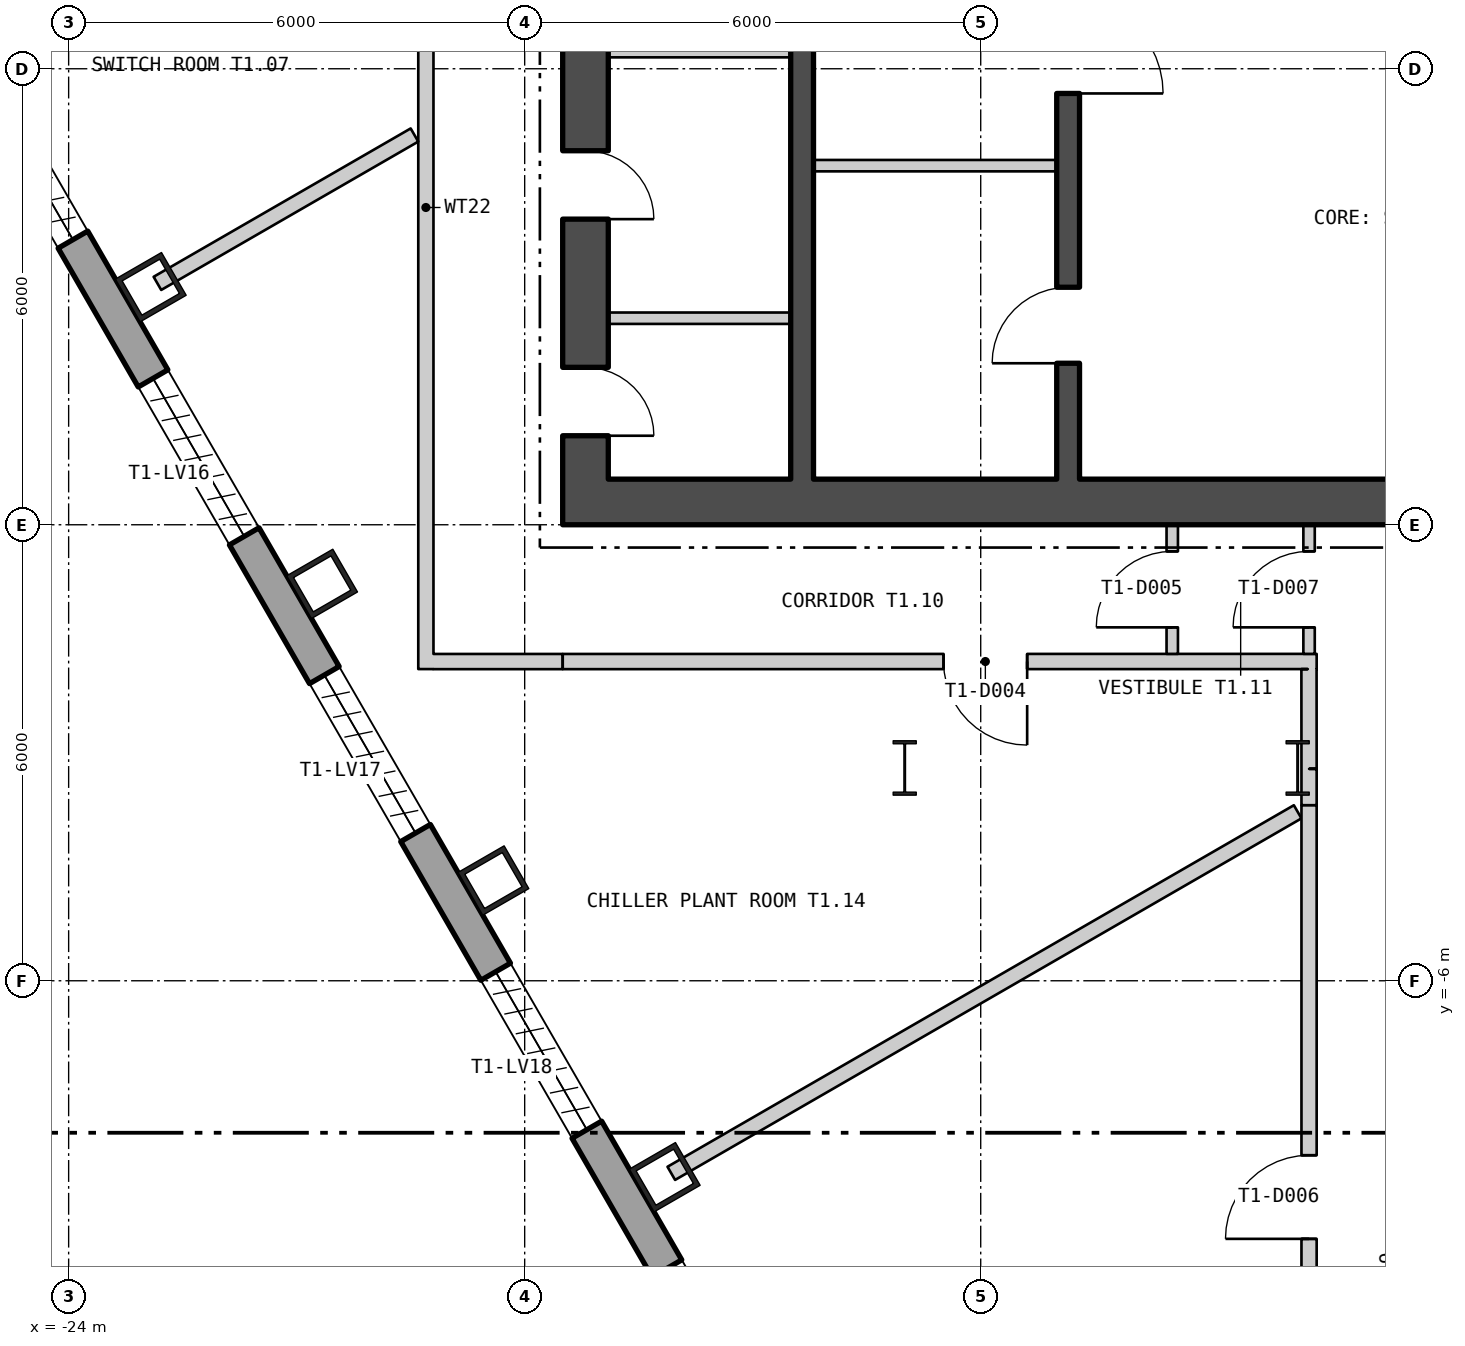
"""IFC4 building model, lengths in metres.
Left out: names, types, materials, properties, quantities, classifications, styles, units other than length and angle.
Written with IfcOpenShell. Run it as: python <this file> out.ifc"""

import sys

from ifc_helpers import new_model, si_unit, direction, frame, frame_2d, origin, origin_2d, place, context, subcontext, project, spatial, polyline, rectangle, hollow_rectangle, i_section, outline, extrude, element, fill, save


model = new_model("IFC4")
c1 = context("Model", 3, precision=1e-05, world=origin(), true_north=direction((0.0, 1.0)))
c2 = subcontext(c1, "Body", "Model", "MODEL_VIEW")
j1 = project(units=[si_unit("LENGTHUNIT", "METRE"), si_unit("PLANEANGLEUNIT", "RADIAN")], contexts=[c1])
p1 = place(None, origin())
s1 = spatial("IfcSite", under=j1, at=p1, CompositionType="ELEMENT")
p2 = place(p1, origin())
s2 = spatial("IfcBuilding", under=s1, at=p2, CompositionType="ELEMENT")
p3 = place(p2, frame((0.0, 0.0, 78.3)))
s3 = spatial("IfcBuildingStorey", under=s2, at=p3, CompositionType="ELEMENT", Elevation=78.3)
for number, where, z_axis, x_axis in (
    (1, (-22.919, 3.126, 0.0), (0.0, 0.0, 1.0), (0.5, -0.866, 0.0)),
    (2, (-20.665, -0.778, 0.0), (0.0, 0.0, 1.0), (0.5, -0.866, 0.0)),
    (3, (-18.411, -4.681, 0.0), (0.0, 0.0, 1.0), (0.5, -0.866, 0.0)),
    (4, (-16.157, -8.585, 0.0), (0.0, 0.0, 1.0), (0.5, -0.866, 0.0)),
):
    element("IfcColumn", number, at=place(p3, frame(where, z_axis=z_axis, x_axis=x_axis)), inside=s3, PredefinedType="COLUMN", context=c2, shape_type="SweptSolid", body=[
        extrude(hollow_rectangle(XDim=0.65, YDim=0.7, WallThickness=0.065, at=origin_2d()), origin(), (0.0, 0.0, 1.0), 6.0),
    ])
for number, where, z_axis, x_axis in (
    (5, (-7.83, -3.2, 0.0), (0.0, 0.0, 1.0), (1.0, 0.0, 0.0)),
    (6, (-13.0, -3.2, 0.0), (0.0, 0.0, 1.0), (1.0, 0.0, 0.0)),
):
    element("IfcColumn", number, at=place(p3, frame(where, z_axis=z_axis, x_axis=x_axis)), inside=s3, PredefinedType="COLUMN", context=c2, shape_type="SweptSolid", body=[
        extrude(i_section(OverallWidth=0.304, OverallDepth=0.716, WebThickness=0.021, FlangeThickness=0.04, at=origin_2d()), origin(), (0.0, 0.0, 1.0), 6.0),
    ])
p4 = place(p3, frame((-28.09, 10.934, -0.18), z_axis=(0.0, 0.0, 1.0), x_axis=(0.500000711659, -0.866024992908, 0.0)))
e7 = element("IfcWall", 7, at=p4, inside=s3, PredefinedType="SOLIDWALL", context=c2, shape_type="SweptSolid", body=[
    extrude(outline(polyline([(-0.13, -0.225), (45.87, -0.225), (45.61, 0.225), (0.13, 0.225), (-0.13, -0.225)])), origin(), (0.0, 0.0, 1.0), 6.0),
])
p5 = place(p4, frame((1.424, 0.0, 1.38)))
e8 = element("IfcOpeningElement", 8, at=p5, cuts=e7, PredefinedType="OPENING", context=c2, shape_type="SweptSolid", body=[
    extrude(rectangle(XDim=2.4, YDim=3.6, at=frame_2d((1.2, 1.8))), frame((0.0, 0.235, 0.0), z_axis=(0.0, -1.0, 0.0), x_axis=(1.0, 0.0, 0.0)), (0.0, 0.0, 1.0), 0.47),
])
p6 = place(p4, frame((5.893, 0.0, 1.38)))
e9 = element("IfcOpeningElement", 9, at=p6, cuts=e7, PredefinedType="OPENING", context=c2, shape_type="SweptSolid", body=[
    extrude(rectangle(XDim=2.4, YDim=3.6, at=frame_2d((1.2, 1.8))), frame((0.0, 0.235, 0.0), z_axis=(0.0, -1.0, 0.0), x_axis=(1.0, 0.0, 0.0)), (0.0, 0.0, 1.0), 0.47),
])
p7 = place(p4, frame((10.401, 0.0, 1.38)))
e10 = element("IfcOpeningElement", 10, at=p7, cuts=e7, PredefinedType="OPENING", context=c2, shape_type="SweptSolid", body=[
    extrude(rectangle(XDim=2.4, YDim=3.6, at=frame_2d((1.2, 1.8))), frame((0.0, 0.235, 0.0), z_axis=(0.0, -1.0, 0.0), x_axis=(1.0, 0.0, 0.0)), (0.0, 0.0, 1.0), 0.47),
])
p8 = place(p4, frame((14.909, 0.0, 1.38)))
e11 = element("IfcOpeningElement", 11, at=p8, cuts=e7, PredefinedType="OPENING", context=c2, shape_type="SweptSolid", body=[
    extrude(rectangle(XDim=2.4, YDim=3.6, at=frame_2d((1.2, 1.8))), frame((0.0, 0.235, 0.0), z_axis=(0.0, -1.0, 0.0), x_axis=(1.0, 0.0, 0.0)), (0.0, 0.0, 1.0), 0.47),
])
p9 = place(p4, frame((19.416, 0.0, 1.38)))
e12 = element("IfcOpeningElement", 12, at=p9, cuts=e7, PredefinedType="OPENING", context=c2, shape_type="SweptSolid", body=[
    extrude(rectangle(XDim=2.4, YDim=3.6, at=frame_2d((1.2, 1.8))), frame((0.0, 0.235, 0.0), z_axis=(0.0, -1.0, 0.0), x_axis=(1.0, 0.0, 0.0)), (0.0, 0.0, 1.0), 0.47),
])
p10 = place(p4, frame((23.924, 0.0, 1.38)))
e13 = element("IfcOpeningElement", 13, at=p10, cuts=e7, PredefinedType="OPENING", context=c2, shape_type="SweptSolid", body=[
    extrude(rectangle(XDim=2.4, YDim=3.6, at=frame_2d((1.2, 1.8))), frame((0.0, 0.235, 0.0), z_axis=(0.0, -1.0, 0.0), x_axis=(1.0, 0.0, 0.0)), (0.0, 0.0, 1.0), 0.47),
])
p11 = place(p4, frame((28.431, 0.0, 1.38)))
e14 = element("IfcOpeningElement", 14, at=p11, cuts=e7, PredefinedType="OPENING", context=c2, shape_type="SweptSolid", body=[
    extrude(rectangle(XDim=2.4, YDim=3.6, at=frame_2d((1.2, 1.8))), frame((0.0, 0.235, 0.0), z_axis=(0.0, -1.0, 0.0), x_axis=(1.0, 0.0, 0.0)), (0.0, 0.0, 1.0), 0.47),
])
p12 = place(p4, frame((32.939, 0.0, 1.38)))
e15 = element("IfcOpeningElement", 15, at=p12, cuts=e7, PredefinedType="OPENING", context=c2, shape_type="SweptSolid", body=[
    extrude(rectangle(XDim=2.4, YDim=3.6, at=frame_2d((1.2, 1.8))), frame((0.0, 0.235, 0.0), z_axis=(0.0, -1.0, 0.0), x_axis=(1.0, 0.0, 0.0)), (0.0, 0.0, 1.0), 0.47),
])
p13 = place(p4, frame((37.447, 0.0, 1.38)))
e16 = element("IfcOpeningElement", 16, at=p13, cuts=e7, PredefinedType="OPENING", context=c2, shape_type="SweptSolid", body=[
    extrude(rectangle(XDim=2.4, YDim=3.6, at=frame_2d((1.2, 1.8))), frame((0.0, 0.235, 0.0), z_axis=(0.0, -1.0, 0.0), x_axis=(1.0, 0.0, 0.0)), (0.0, 0.0, 1.0), 0.47),
])
p14 = place(p4, frame((41.916, 0.0, 1.38)))
e17 = element("IfcOpeningElement", 17, at=p14, cuts=e7, PredefinedType="OPENING", context=c2, shape_type="SweptSolid", body=[
    extrude(rectangle(XDim=2.4, YDim=3.6, at=frame_2d((1.2, 1.8))), frame((0.0, 0.235, 0.0), z_axis=(0.0, -1.0, 0.0), x_axis=(1.0, 0.0, 0.0)), (0.0, 0.0, 1.0), 0.47),
])
p15 = place(p3, frame((-17.5, 0.3, 0.0), z_axis=(0.0, 0.0, 1.0), x_axis=(1.0, 0.0, 0.0)))
e18 = element("IfcWall", 18, at=p15, inside=s3, PredefinedType="SHEAR", context=c2, shape_type="SweptSolid", body=[
    extrude(rectangle(XDim=35.0, YDim=0.6, at=frame_2d((17.5, 0.0))), origin(), (0.0, 0.0, 1.0), 5.8),
])
p16 = place(p15, frame((12.0, 0.0, 0.0)))
e19 = element("IfcOpeningElement", 19, at=p16, cuts=e18, PredefinedType="OPENING", context=c2, shape_type="SweptSolid", body=[
    extrude(rectangle(XDim=1.8, YDim=2.4, at=frame_2d((0.9, 1.2))), frame((0.0, 0.31, 0.0), z_axis=(0.0, -1.0, 0.0), x_axis=(1.0, 0.0, 0.0)), (0.0, 0.0, 1.0), 0.62),
])
p17 = place(p15, frame((22.0, 0.0, 0.0)))
e20 = element("IfcOpeningElement", 20, at=p17, cuts=e18, PredefinedType="OPENING", context=c2, shape_type="SweptSolid", body=[
    extrude(rectangle(XDim=1.8, YDim=2.4, at=frame_2d((0.9, 1.2))), frame((0.0, 0.31, 0.0), z_axis=(0.0, -1.0, 0.0), x_axis=(1.0, 0.0, 0.0)), (0.0, 0.0, 1.0), 0.62),
])
p18 = place(p3, frame((-17.2, 0.6, 0.0), z_axis=(0.0, 0.0, 1.0), x_axis=(0.0, 1.0, 0.0)))
e21 = element("IfcWall", 21, at=p18, inside=s3, PredefinedType="SHEAR", context=c2, shape_type="SweptSolid", body=[
    extrude(rectangle(XDim=16.8, YDim=0.6, at=frame_2d((8.4, 0.0))), origin(), (0.0, 0.0, 1.0), 5.8),
])
p19 = place(p18, frame((5.7, 0.0, 0.0)))
e22 = element("IfcOpeningElement", 22, at=p19, cuts=e21, PredefinedType="OPENING", context=c2, shape_type="SweptSolid", body=[
    extrude(rectangle(XDim=1.5, YDim=2.1, at=frame_2d((0.75, 1.05))), frame((0.0, 0.31, 0.0), z_axis=(0.0, -1.0, 0.0), x_axis=(1.0, 0.0, 0.0)), (0.0, 0.0, 1.0), 0.62),
])
p20 = place(p18, frame((0.571, 0.0, 0.0)))
e23 = element("IfcOpeningElement", 23, at=p20, cuts=e21, PredefinedType="OPENING", context=c2, shape_type="SweptSolid", body=[
    extrude(rectangle(XDim=0.9, YDim=2.1, at=frame_2d((0.45, 1.05))), frame((0.0, 0.31, 0.0), z_axis=(0.0, -1.0, 0.0), x_axis=(1.0, 0.0, 0.0)), (0.0, 0.0, 1.0), 0.62),
])
p21 = place(p18, frame((3.421, 0.0, 0.0)))
e24 = element("IfcOpeningElement", 24, at=p21, cuts=e21, PredefinedType="OPENING", context=c2, shape_type="SweptSolid", body=[
    extrude(rectangle(XDim=0.9, YDim=2.1, at=frame_2d((0.45, 1.05))), frame((0.0, 0.31, 0.0), z_axis=(0.0, -1.0, 0.0), x_axis=(1.0, 0.0, 0.0)), (0.0, 0.0, 1.0), 0.62),
])
p22 = place(p18, frame((9.473, 0.0, 0.0)))
e25 = element("IfcOpeningElement", 25, at=p22, cuts=e21, PredefinedType="OPENING", context=c2, shape_type="SweptSolid", body=[
    extrude(rectangle(XDim=1.0, YDim=2.1, at=frame_2d((0.5, 1.05))), frame((0.0, 0.31, 0.0), z_axis=(0.0, -1.0, 0.0), x_axis=(1.0, 0.0, 0.0)), (0.0, 0.0, 1.0), 0.62),
])
p23 = place(p18, frame((14.323, 0.0, 0.0)))
e26 = element("IfcOpeningElement", 26, at=p23, cuts=e21, PredefinedType="OPENING", context=c2, shape_type="SweptSolid", body=[
    extrude(rectangle(XDim=0.9, YDim=2.1, at=frame_2d((0.45, 1.05))), frame((0.0, 0.31, 0.0), z_axis=(0.0, -1.0, 0.0), x_axis=(1.0, 0.0, 0.0)), (0.0, 0.0, 1.0), 0.62),
])
p24 = place(p3, frame((-10.85, 0.6, 0.0), z_axis=(0.0, 0.0, 1.0), x_axis=(0.0, 1.0, 0.0)))
e27 = element("IfcWall", 27, at=p24, inside=s3, PredefinedType="SHEAR", context=c2, shape_type="SweptSolid", body=[
    extrude(rectangle(XDim=16.8, YDim=0.3, at=frame_2d((8.4, 0.0))), origin(), (0.0, 0.0, 1.0), 5.8),
])
p25 = place(p24, frame((5.075, 0.0, 0.0)))
e28 = element("IfcOpeningElement", 28, at=p25, cuts=e27, PredefinedType="OPENING", context=c2, shape_type="SweptSolid", body=[
    extrude(rectangle(XDim=1.25, YDim=2.1, at=frame_2d((0.625, 1.05))), frame((0.0, 0.16, 0.0), z_axis=(0.0, -1.0, 0.0), x_axis=(1.0, 0.0, 0.0)), (0.0, 0.0, 1.0), 0.32),
])
p26 = place(p24, frame((1.525, 0.0, 0.0)))
e29 = element("IfcOpeningElement", 29, at=p26, cuts=e27, PredefinedType="OPENING", context=c2, shape_type="SweptSolid", body=[
    extrude(rectangle(XDim=1.0, YDim=2.1, at=frame_2d((0.5, 1.05))), frame((0.0, 0.16, 0.0), z_axis=(0.0, -1.0, 0.0), x_axis=(1.0, 0.0, 0.0)), (0.0, 0.0, 1.0), 0.32),
])
p27 = place(p3, frame((-14.35, 0.6, 0.0), z_axis=(0.0, 0.0, 1.0), x_axis=(0.0, 1.0, 0.0)))
e30 = element("IfcWall", 30, at=p27, inside=s3, PredefinedType="SHEAR", context=c2, shape_type="SweptSolid", body=[
    extrude(rectangle(XDim=16.8, YDim=0.3, at=frame_2d((8.4, 0.0))), origin(), (0.0, 0.0, 1.0), 5.8),
])
p28 = place(p27, frame((5.7, 0.0, 0.0)))
e31 = element("IfcOpeningElement", 31, at=p28, cuts=e30, PredefinedType="OPENING", context=c2, shape_type="SweptSolid", body=[
    extrude(rectangle(XDim=1.5, YDim=2.1, at=frame_2d((0.75, 1.05))), frame((0.0, 0.16, 0.0), z_axis=(0.0, -1.0, 0.0), x_axis=(1.0, 0.0, 0.0)), (0.0, 0.0, 1.0), 0.32),
])
p29 = place(p3, frame((-14.2, 4.725, 0.0), z_axis=(0.0, 0.0, 1.0), x_axis=(1.0, 0.0, 0.0)))
e32 = element("IfcWall", 32, at=p29, inside=s3, PredefinedType="PARTITIONING", context=c2, shape_type="SweptSolid", body=[
    extrude(rectangle(XDim=3.2, YDim=0.15, at=frame_2d((1.6, 0.0))), origin(), (0.0, 0.0, 1.0), 5.8),
])
for number, where, z_axis, x_axis in (
    (33, (-16.9, 6.225, 0.0), (0.0, 0.0, 1.0), (1.0, 0.0, 0.0)),
    (34, (-16.9, 2.718, 0.0), (0.0, 0.0, 1.0), (1.0, 0.0, 0.0)),
):
    element("IfcWall", number, at=place(p3, frame(where, z_axis=z_axis, x_axis=x_axis)), inside=s3, PredefinedType="PARTITIONING", context=c2, shape_type="SweptSolid", body=[
        extrude(rectangle(XDim=2.4, YDim=0.15, at=frame_2d((1.2, 0.0))), origin(), (0.0, 0.0, 1.0), 5.8),
    ])
p30 = place(p3, frame((-22.832, 3.176, 0.0), z_axis=(0.0, 0.0, 1.0), x_axis=(0.86609177584, 0.499885022602, 0.0)))
e35 = element("IfcWall", 35, at=p30, inside=s3, PredefinedType="PARTITIONING", context=c2, shape_type="SweptSolid", body=[
    extrude(rectangle(XDim=3.905, YDim=0.2, at=frame_2d((1.952, 0.0))), origin(), (0.0, 0.0, 1.0), 5.8),
])
p31 = place(p3, frame((-19.3, -1.899, 0.0), z_axis=(0.0, 0.0, 1.0), x_axis=(0.0, 1.0, 0.0)))
e36 = element("IfcWall", 36, at=p31, inside=s3, PredefinedType="PARTITIONING", context=c2, shape_type="SweptSolid", body=[
    extrude(rectangle(XDim=12.147, YDim=0.2, at=frame_2d((6.074, 0.0))), origin(), (0.0, 0.0, 1.0), 5.8),
])
p32 = place(p31, frame((9.03, 0.0, 0.0)))
e37 = element("IfcOpeningElement", 37, at=p32, cuts=e36, PredefinedType="OPENING", context=c2, shape_type="SweptSolid", body=[
    extrude(rectangle(XDim=1.1, YDim=2.1, at=frame_2d((0.55, 1.05))), frame((0.0, 0.11, 0.0), z_axis=(0.0, -1.0, 0.0), x_axis=(1.0, 0.0, 0.0)), (0.0, 0.0, 1.0), 0.22),
])
p33 = place(p3, frame((-19.2, -1.8, 0.0), z_axis=(0.0, 0.0, 1.0), x_axis=(1.0, 0.0, 0.0)))
e38 = element("IfcWall", 38, at=p33, inside=s3, PredefinedType="PARTITIONING", context=c2, shape_type="SweptSolid", body=[
    extrude(rectangle(XDim=1.699, YDim=0.2, at=frame_2d((0.85, 0.0))), origin(), (0.0, 0.0, 1.0), 5.8),
])
p34 = place(p3, frame((-17.499, -1.8, 0.0), z_axis=(0.0, 0.0, 1.0), x_axis=(0.999999994918, 0.000100816614, 0.0)))
e39 = element("IfcWall", 39, at=p34, inside=s3, PredefinedType="PARTITIONING", context=c2, shape_type="SweptSolid", body=[
    extrude(rectangle(XDim=9.919, YDim=0.2, at=frame_2d((4.96, 0.0))), origin(), (0.0, 0.0, 1.0), 5.8),
])
p35 = place(p34, frame((5.01, 0.0, 0.0)))
e40 = element("IfcOpeningElement", 40, at=p35, cuts=e39, PredefinedType="OPENING", context=c2, shape_type="SweptSolid", body=[
    extrude(rectangle(XDim=1.1, YDim=2.1, at=frame_2d((0.55, 1.05))), frame((0.0, 0.11, 0.0), z_axis=(0.0, -1.0, 0.0), x_axis=(1.0, 0.0, 0.0)), (0.0, 0.0, 1.0), 0.22),
])
p36 = place(p3, frame((-16.071, -8.534, 0.0), z_axis=(0.0, 0.0, 1.0), x_axis=(0.866068339032, 0.499925626596, 0.0)))
e41 = element("IfcWall", 41, at=p36, inside=s3, PredefinedType="PARTITIONING", context=c2, shape_type="SweptSolid", body=[
    extrude(rectangle(XDim=9.515, YDim=0.2, at=frame_2d((4.758, 0.0))), origin(), (0.0, 0.0, 1.0), 5.8),
])
p37 = place(p3, frame((-9.48, -1.699, 0.0), z_axis=(0.0, 0.0, 1.0), x_axis=(0.0, 1.0, 0.0)))
e42 = element("IfcWall", 42, at=p37, inside=s3, PredefinedType="PARTITIONING", context=c2, shape_type="SweptSolid", body=[
    extrude(rectangle(XDim=1.698, YDim=0.15, at=frame_2d((0.849, 0.0))), origin(), (0.0, 0.0, 1.0), 5.2),
])
p38 = place(p37, frame((0.349, 0.0, 0.0)))
e43 = element("IfcOpeningElement", 43, at=p38, cuts=e42, PredefinedType="OPENING", context=c2, shape_type="SweptSolid", body=[
    extrude(rectangle(XDim=1.0, YDim=2.1, at=frame_2d((0.5, 1.05))), frame((0.0, 0.085, 0.0), z_axis=(0.0, -1.0, 0.0), x_axis=(1.0, 0.0, 0.0)), (0.0, 0.0, 1.0), 0.17),
])
p39 = place(p3, frame((-7.681, -1.899, 0.0), z_axis=(0.0, 0.0, 1.0), x_axis=(0.000761614402, -0.999999709972, 0.0)))
e44 = element("IfcWall", 44, at=p39, inside=s3, PredefinedType="PARTITIONING", context=c2, shape_type="SweptSolid", body=[
    extrude(rectangle(XDim=1.313, YDim=0.2, at=frame_2d((0.656, 0.0))), origin(), (0.0, 0.0, 1.0), 5.8),
])
p40 = place(p3, frame((-7.68, -13.7, 0.0), z_axis=(0.0, 0.0, 1.0), x_axis=(0.0, 1.0, 0.0)))
e45 = element("IfcWall", 45, at=p40, inside=s3, PredefinedType="PARTITIONING", context=c2, shape_type="SweptSolid", body=[
    extrude(rectangle(XDim=10.008, YDim=0.2, at=frame_2d((5.004, 0.0))), origin(), (0.0, 0.0, 1.0), 5.2),
])
p41 = place(p40, frame((4.304, 0.0, 0.0)))
e46 = element("IfcOpeningElement", 46, at=p41, cuts=e45, PredefinedType="OPENING", context=c2, shape_type="SweptSolid", body=[
    extrude(rectangle(XDim=1.1, YDim=2.1, at=frame_2d((0.55, 1.05))), frame((0.0, 0.11, 0.0), z_axis=(0.0, -1.0, 0.0), x_axis=(1.0, 0.0, 0.0)), (0.0, 0.0, 1.0), 0.22),
])
p42 = place(p3, frame((-7.68, -3.69, 0.0), z_axis=(0.0, 0.0, 1.0), x_axis=(0.0, 1.0, 0.0)))
e47 = element("IfcWall", 47, at=p42, inside=s3, PredefinedType="PARTITIONING", context=c2, shape_type="SweptSolid", body=[
    extrude(rectangle(XDim=0.478, YDim=0.2, at=frame_2d((0.239, 0.0))), origin(), (0.0, 0.0, 1.0), 5.2),
])
p43 = place(p3, frame((-7.68, -1.699, 0.0), z_axis=(0.0, 0.0, 1.0), x_axis=(0.0, 1.0, 0.0)))
e48 = element("IfcWall", 48, at=p43, inside=s3, PredefinedType="PARTITIONING", context=c2, shape_type="SweptSolid", body=[
    extrude(rectangle(XDim=1.698, YDim=0.15, at=frame_2d((0.849, 0.0))), origin(), (0.0, 0.0, 1.0), 5.8),
])
p44 = place(p43, frame((0.349, 0.0, 0.0)))
e49 = element("IfcOpeningElement", 49, at=p44, cuts=e48, PredefinedType="OPENING", context=c2, shape_type="SweptSolid", body=[
    extrude(rectangle(XDim=1.0, YDim=2.1, at=frame_2d((0.5, 1.05))), frame((0.0, 0.085, 0.0), z_axis=(0.0, -1.0, 0.0), x_axis=(1.0, 0.0, 0.0)), (0.0, 0.0, 1.0), 0.17),
])
p45 = place(p25, origin())
e50 = element("IfcDoor", 50, at=p45, inside=s3, OperationType="SINGLE_SWING_LEFT", PredefinedType="DOOR", context=c2, shape_type="SweptSolid", body=[
    extrude(rectangle(XDim=1.25, YDim=2.1, at=frame_2d((0.625, 1.05))), frame((0.0, 0.025, 0.0), z_axis=(0.0, -1.0, 0.0), x_axis=(1.0, 0.0, 0.0)), (0.0, 0.0, 1.0), 0.05),
])
fill(e28, e50)
p46 = place(p26, origin())
e51 = element("IfcDoor", 51, at=p46, inside=s3, OperationType="SINGLE_SWING_RIGHT", PredefinedType="DOOR", context=c2, shape_type="SweptSolid", body=[
    extrude(rectangle(XDim=1.0, YDim=2.1, at=frame_2d((0.5, 1.05))), frame((0.0, 0.025, 0.0), z_axis=(0.0, -1.0, 0.0), x_axis=(1.0, 0.0, 0.0)), (0.0, 0.0, 1.0), 0.05),
])
fill(e29, e51)
p47 = place(p20, origin())
e52 = element("IfcDoor", 52, at=p47, inside=s3, OperationType="SINGLE_SWING_LEFT", PredefinedType="DOOR", context=c2, shape_type="SweptSolid", body=[
    extrude(rectangle(XDim=0.9, YDim=2.1, at=frame_2d((0.45, 1.05))), frame((0.0, 0.025, 0.0), z_axis=(0.0, -1.0, 0.0), x_axis=(1.0, 0.0, 0.0)), (0.0, 0.0, 1.0), 0.05),
])
fill(e23, e52)
p48 = place(p21, origin())
e53 = element("IfcDoor", 53, at=p48, inside=s3, OperationType="SINGLE_SWING_LEFT", PredefinedType="DOOR", context=c2, shape_type="SweptSolid", body=[
    extrude(rectangle(XDim=0.9, YDim=2.1, at=frame_2d((0.45, 1.05))), frame((0.0, 0.025, 0.0), z_axis=(0.0, -1.0, 0.0), x_axis=(1.0, 0.0, 0.0)), (0.0, 0.0, 1.0), 0.05),
])
fill(e24, e53)
p49 = place(p35, origin())
e54 = element("IfcDoor", 54, at=p49, inside=s3, OperationType="SINGLE_SWING_RIGHT", PredefinedType="DOOR", context=c2, shape_type="SweptSolid", body=[
    extrude(rectangle(XDim=1.1, YDim=2.1, at=frame_2d((0.55, 1.05))), frame((0.0, 0.025, 0.0), z_axis=(0.0, -1.0, 0.0), x_axis=(1.0, 0.0, 0.0)), (0.0, 0.0, 1.0), 0.05),
])
fill(e40, e54)
p50 = place(p38, origin())
e55 = element("IfcDoor", 55, at=p50, inside=s3, OperationType="SINGLE_SWING_RIGHT", PredefinedType="DOOR", context=c2, shape_type="SweptSolid", body=[
    extrude(rectangle(XDim=1.0, YDim=2.1, at=frame_2d((0.5, 1.05))), frame((0.0, 0.025, 0.0), z_axis=(0.0, -1.0, 0.0), x_axis=(1.0, 0.0, 0.0)), (0.0, 0.0, 1.0), 0.05),
])
fill(e43, e55)
p51 = place(p41, origin())
e56 = element("IfcDoor", 56, at=p51, inside=s3, OperationType="SINGLE_SWING_RIGHT", PredefinedType="DOOR", context=c2, shape_type="SweptSolid", body=[
    extrude(rectangle(XDim=1.1, YDim=2.1, at=frame_2d((0.55, 1.05))), frame((0.0, 0.025, 0.0), z_axis=(0.0, -1.0, 0.0), x_axis=(1.0, 0.0, 0.0)), (0.0, 0.0, 1.0), 0.05),
])
fill(e46, e56)
p52 = place(p44, origin())
e57 = element("IfcDoor", 57, at=p52, inside=s3, OperationType="SINGLE_SWING_RIGHT", PredefinedType="DOOR", context=c2, shape_type="SweptSolid", body=[
    extrude(rectangle(XDim=1.0, YDim=2.1, at=frame_2d((0.5, 1.05))), frame((0.0, 0.025, 0.0), z_axis=(0.0, -1.0, 0.0), x_axis=(1.0, 0.0, 0.0)), (0.0, 0.0, 1.0), 0.05),
])
fill(e49, e57)
save(model, sys.argv[1])
